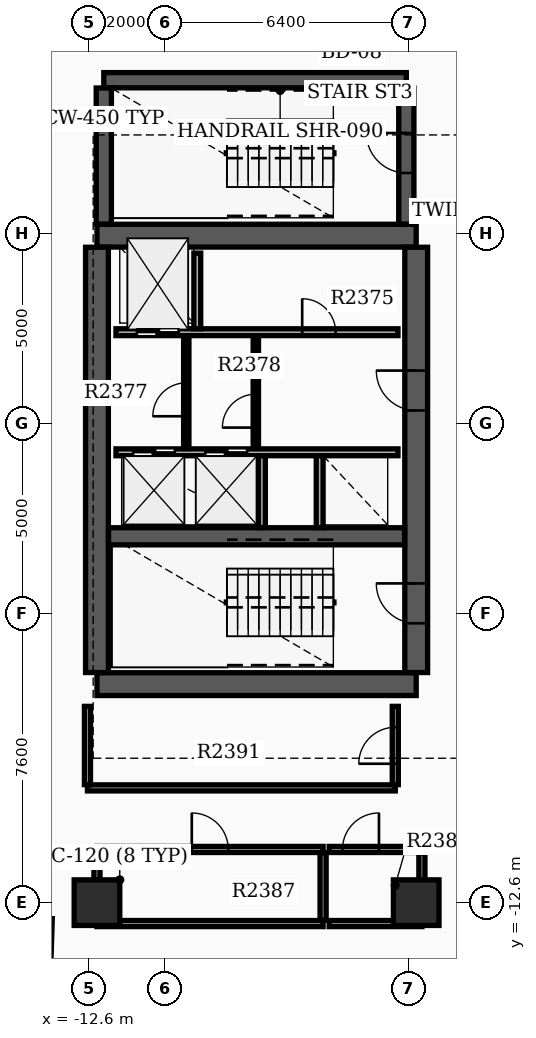
"""IFC4 building model, lengths in metres.
Left out: names, types, materials, properties, quantities, classifications, styles, units other than length and angle.
Written with IfcOpenShell. Run it as: python <this file> out.ifc"""

import sys

from ifc_helpers import new_model, si_unit, direction, frame, frame_2d, origin, origin_2d, place, context, subcontext, project, spatial, rectangle, extrude, element, fill, save


model = new_model("IFC4")
c1 = context("Model", 3, precision=1e-05, world=origin(), true_north=direction((0.0, 1.0)))
c2 = subcontext(c1, "Body", "Model", "MODEL_VIEW")
j1 = project(units=[si_unit("LENGTHUNIT", "METRE"), si_unit("PLANEANGLEUNIT", "RADIAN")], contexts=[c1])
p1 = place(None, origin())
s1 = spatial("IfcSite", under=j1, at=p1, CompositionType="ELEMENT")
p2 = place(p1, origin())
s2 = spatial("IfcBuilding", under=s1, at=p2, CompositionType="ELEMENT")
p3 = place(p2, frame((0.0, 0.0, 152.7)))
s3 = spatial("IfcBuildingStorey", under=s2, at=p3, CompositionType="ELEMENT", Elevation=152.7)
for number, where, z_axis, x_axis in (
    (1, (-12.4, -6.85, 0.0), (0.0, 0.0, 1.0), (1.0, 0.0, 0.0)),
    (2, (-12.4, 4.95, 0.0), (0.0, 0.0, 1.0), (1.0, 0.0, 0.0)),
):
    element("IfcWall", number, at=place(p3, frame(where, z_axis=z_axis, x_axis=x_axis)), inside=s3, PredefinedType="SHEAR", context=c2, shape_type="SweptSolid", body=[
        extrude(rectangle(XDim=8.4, YDim=0.6, at=frame_2d((4.2, 0.0))), origin(), (0.0, 0.0, 1.0), 3.7),
    ])
p4 = place(p3, frame((-12.4, -6.545, 0.0), z_axis=(0.0, 0.0, 1.0), x_axis=(0.0, 1.0, 0.0)))
e3 = element("IfcWall", 3, at=p4, inside=s3, PredefinedType="SHEAR", context=c2, shape_type="SweptSolid", body=[
    extrude(rectangle(XDim=11.19, YDim=0.6, at=frame_2d((5.595, 0.0))), origin(), (0.0, 0.0, 1.0), 3.7),
])
p5 = place(p3, frame((-4.0, -6.545, 0.0), z_axis=(0.0, 0.0, 1.0), x_axis=(0.0, 1.0, 0.0)))
e4 = element("IfcWall", 4, at=p5, inside=s3, PredefinedType="SHEAR", context=c2, shape_type="SweptSolid", body=[
    extrude(rectangle(XDim=11.19, YDim=0.6, at=frame_2d((5.595, 0.0))), origin(), (0.0, 0.0, 1.0), 3.7),
])
p6 = place(p5, frame((1.295, 0.0, 0.0)))
e5 = element("IfcOpeningElement", 5, at=p6, cuts=e4, PredefinedType="OPENING", context=c2, shape_type="SweptSolid", body=[
    extrude(rectangle(XDim=1.05, YDim=2.15, at=frame_2d((0.525, 1.075))), frame((0.0, 0.31, 0.0), z_axis=(0.0, -1.0, 0.0), x_axis=(1.0, 0.0, 0.0)), (0.0, 0.0, 1.0), 0.62),
])
p7 = place(p5, frame((6.895, 0.0, 0.0)))
e6 = element("IfcOpeningElement", 6, at=p7, cuts=e4, PredefinedType="OPENING", context=c2, shape_type="SweptSolid", body=[
    extrude(rectangle(XDim=1.05, YDim=2.15, at=frame_2d((0.525, 1.075))), frame((0.0, 0.31, 0.0), z_axis=(0.0, -1.0, 0.0), x_axis=(1.0, 0.0, 0.0)), (0.0, 0.0, 1.0), 0.62),
])
p8 = place(p3, frame((-12.095, -2.96, 0.0), z_axis=(0.0, 0.0, 1.0), x_axis=(1.0, 0.0, 0.0)))
e7 = element("IfcWall", 7, at=p8, inside=s3, PredefinedType="SHEAR", context=c2, shape_type="SweptSolid", body=[
    extrude(rectangle(XDim=7.79, YDim=0.45, at=frame_2d((3.895, 0.0))), origin(), (0.0, 0.0, 1.0), 3.7),
])
p9 = place(p3, frame((-12.22, 9.04, 0.0), z_axis=(0.0, 0.0, 1.0), x_axis=(1.0, 0.0, 0.0)))
e8 = element("IfcWall", 8, at=p9, inside=s3, PredefinedType="SHEAR", context=c2, shape_type="SweptSolid", body=[
    extrude(rectangle(XDim=7.96, YDim=0.4, at=frame_2d((3.98, 0.0))), origin(), (0.0, 0.0, 1.0), 3.7),
])
p10 = place(p3, frame((-12.22, 5.255, 0.0), z_axis=(0.0, 0.0, 1.0), x_axis=(0.0, 1.0, 0.0)))
e9 = element("IfcWall", 9, at=p10, inside=s3, PredefinedType="SHEAR", context=c2, shape_type="SweptSolid", body=[
    extrude(rectangle(XDim=3.58, YDim=0.4, at=frame_2d((1.79, 0.0))), origin(), (0.0, 0.0, 1.0), 3.7),
])
p11 = place(p3, frame((-4.26, 5.255, 0.0), z_axis=(0.0, 0.0, 1.0), x_axis=(0.0, 1.0, 0.0)))
e10 = element("IfcWall", 10, at=p11, inside=s3, PredefinedType="SHEAR", context=c2, shape_type="SweptSolid", body=[
    extrude(rectangle(XDim=3.58, YDim=0.4, at=frame_2d((1.79, 0.0))), origin(), (0.0, 0.0, 1.0), 3.7),
])
p12 = place(p11, frame((1.345, 0.0, 0.0)))
e11 = element("IfcOpeningElement", 11, at=p12, cuts=e10, PredefinedType="OPENING", context=c2, shape_type="SweptSolid", body=[
    extrude(rectangle(XDim=1.05, YDim=2.15, at=frame_2d((0.525, 1.075))), frame((0.0, 0.21, 0.0), z_axis=(0.0, -1.0, 0.0), x_axis=(1.0, 0.0, 0.0)), (0.0, 0.0, 1.0), 0.42),
])
for number, where, z_axis, x_axis in (
    (12, (-12.4, -12.6, 0.0), (0.0, 0.0, 1.0), (1.0, 0.0, 0.0)),
    (13, (-4.0, -12.6, 0.0), (0.0, 0.0, 1.0), (1.0, 0.0, 0.0)),
):
    element("IfcColumn", number, at=place(p3, frame(where, z_axis=z_axis, x_axis=x_axis)), inside=s3, PredefinedType="COLUMN", context=c2, shape_type="SweptSolid", body=[
        extrude(rectangle(XDim=1.2, YDim=1.2, at=origin_2d()), origin(), (0.0, 0.0, 1.0), 3.9),
    ])
p13 = place(p3, frame((-11.9, 2.41, 0.0), z_axis=(0.0, 0.0, 1.0), x_axis=(1.0, 0.0, 0.0)))
e14 = element("IfcWall", 14, at=p13, inside=s3, PredefinedType="SOLIDWALL", context=c2, shape_type="SweptSolid", body=[
    extrude(rectangle(XDim=7.42, YDim=0.18, at=frame_2d((3.71, 0.0))), origin(), (0.0, 0.0, 1.0), 2.96),
])
p14 = place(p13, frame((0.55, 0.0, 0.0)))
e15 = element("IfcOpeningElement", 15, at=p14, cuts=e14, PredefinedType="OPENING", context=c2, shape_type="SweptSolid", body=[
    extrude(rectangle(XDim=1.1, YDim=2.15, at=frame_2d((0.55, 1.075))), frame((0.0, 0.1, 0.0), z_axis=(0.0, -1.0, 0.0), x_axis=(1.0, 0.0, 0.0)), (0.0, 0.0, 1.0), 0.2),
])
p15 = place(p13, frame((4.9, 0.0, 0.0)))
e16 = element("IfcOpeningElement", 16, at=p15, cuts=e14, PredefinedType="OPENING", context=c2, shape_type="SweptSolid", body=[
    extrude(rectangle(XDim=0.88, YDim=2.1, at=frame_2d((0.44, 1.05))), frame((0.0, 0.1, 0.0), z_axis=(0.0, -1.0, 0.0), x_axis=(1.0, 0.0, 0.0)), (0.0, 0.0, 1.0), 0.2),
])
p16 = place(p3, frame((-11.9, -0.75, 0.0), z_axis=(0.0, 0.0, 1.0), x_axis=(1.0, 0.0, 0.0)))
e17 = element("IfcWall", 17, at=p16, inside=s3, PredefinedType="SOLIDWALL", context=c2, shape_type="SweptSolid", body=[
    extrude(rectangle(XDim=7.42, YDim=0.18, at=frame_2d((3.71, 0.0))), origin(), (0.0, 0.0, 1.0), 2.96),
])
p17 = place(p16, frame((0.45, 0.0, 0.0)))
e18 = element("IfcOpeningElement", 18, at=p17, cuts=e17, PredefinedType="OPENING", context=c2, shape_type="SweptSolid", body=[
    extrude(rectangle(XDim=1.1, YDim=2.15, at=frame_2d((0.55, 1.075))), frame((0.0, 0.1, 0.0), z_axis=(0.0, -1.0, 0.0), x_axis=(1.0, 0.0, 0.0)), (0.0, 0.0, 1.0), 0.2),
])
p18 = place(p16, frame((2.35, 0.0, 0.0)))
e19 = element("IfcOpeningElement", 19, at=p18, cuts=e17, PredefinedType="OPENING", context=c2, shape_type="SweptSolid", body=[
    extrude(rectangle(XDim=1.1, YDim=2.15, at=frame_2d((0.55, 1.075))), frame((0.0, 0.1, 0.0), z_axis=(0.0, -1.0, 0.0), x_axis=(1.0, 0.0, 0.0)), (0.0, 0.0, 1.0), 0.2),
])
p19 = place(p3, frame((-9.76, 2.5, 0.0), z_axis=(0.0, 0.0, 1.0), x_axis=(0.0, 1.0, 0.0)))
e20 = element("IfcWall", 20, at=p19, inside=s3, PredefinedType="SOLIDWALL", context=c2, shape_type="SweptSolid", body=[
    extrude(rectangle(XDim=1.99, YDim=0.18, at=frame_2d((0.995, 0.0))), origin(), (0.0, 0.0, 1.0), 2.96),
])
for number, where, z_axis, x_axis in (
    (21, (-8.06, -2.73, 0.0), (0.0, 0.0, 1.0), (0.0, 1.0, 0.0)),
    (22, (-6.54, -2.73, 0.0), (0.0, 0.0, 1.0), (0.0, 1.0, 0.0)),
):
    element("IfcWall", number, at=place(p3, frame(where, z_axis=z_axis, x_axis=x_axis)), inside=s3, PredefinedType="SOLIDWALL", context=c2, shape_type="SweptSolid", body=[
        extrude(rectangle(XDim=1.89, YDim=0.18, at=frame_2d((0.945, 0.0))), origin(), (0.0, 0.0, 1.0), 2.96),
    ])
p20 = place(p3, frame((-8.22, -0.65, 0.0), z_axis=(0.0, 0.0, 1.0), x_axis=(0.0, 1.0, 0.0)))
e23 = element("IfcWall", 23, at=p20, inside=s3, PredefinedType="SOLIDWALL", context=c2, shape_type="SweptSolid", body=[
    extrude(rectangle(XDim=2.96, YDim=0.14, at=frame_2d((1.48, 0.0))), origin(), (0.0, 0.0, 1.0), 2.96),
])
p21 = place(p20, frame((0.55, 0.0, 0.0)))
e24 = element("IfcOpeningElement", 24, at=p21, cuts=e23, PredefinedType="OPENING", context=c2, shape_type="SweptSolid", body=[
    extrude(rectangle(XDim=0.88, YDim=2.1, at=frame_2d((0.44, 1.05))), frame((0.0, 0.08, 0.0), z_axis=(0.0, -1.0, 0.0), x_axis=(1.0, 0.0, 0.0)), (0.0, 0.0, 1.0), 0.16),
])
p22 = place(p3, frame((-10.05, -0.652, 0.0), z_axis=(0.0, 0.0, 1.0), x_axis=(0.0, 1.0, 0.0)))
e25 = element("IfcWall", 25, at=p22, inside=s3, PredefinedType="PARTITIONING", context=c2, shape_type="SweptSolid", body=[
    extrude(rectangle(XDim=2.962, YDim=0.14, at=frame_2d((1.481, 0.0))), origin(), (0.0, 0.0, 1.0), 2.96),
])
p23 = place(p22, frame((0.85, 0.0, 0.0)))
e26 = element("IfcOpeningElement", 26, at=p23, cuts=e25, PredefinedType="OPENING", context=c2, shape_type="SweptSolid", body=[
    extrude(rectangle(XDim=0.88, YDim=2.1, at=frame_2d((0.44, 1.05))), frame((0.0, 0.08, 0.0), z_axis=(0.0, -1.0, 0.0), x_axis=(1.0, 0.0, 0.0)), (0.0, 0.0, 1.0), 0.16),
])
p24 = place(p3, frame((-12.4, -13.15, 0.0), z_axis=(0.0, 0.0, 1.0), x_axis=(1.0, 0.0, 0.0)))
e27 = element("IfcWall", 27, at=p24, inside=s3, PredefinedType="PARTITIONING", context=c2, shape_type="SweptSolid", body=[
    extrude(rectangle(XDim=5.95, YDim=0.16, at=frame_2d((2.975, 0.0))), origin(), (0.0, 0.0, 1.0), 2.96),
])
p25 = place(p3, frame((-12.4, -11.2, 0.0), z_axis=(0.0, 0.0, 1.0), x_axis=(1.0, 0.0, 0.0)))
e28 = element("IfcWall", 28, at=p25, inside=s3, PredefinedType="PARTITIONING", context=c2, shape_type="SweptSolid", body=[
    extrude(rectangle(XDim=5.95, YDim=0.16, at=frame_2d((2.975, 0.0))), origin(), (0.0, 0.0, 1.0), 2.96),
])
p26 = place(p25, frame((2.495, 0.0, 0.0)))
e29 = element("IfcOpeningElement", 29, at=p26, cuts=e28, PredefinedType="OPENING", context=c2, shape_type="SweptSolid", body=[
    extrude(rectangle(XDim=0.96, YDim=2.15, at=frame_2d((0.48, 1.075))), frame((0.0, 0.09, 0.0), z_axis=(0.0, -1.0, 0.0), x_axis=(1.0, 0.0, 0.0)), (0.0, 0.0, 1.0), 0.18),
])
for number, where, z_axis, x_axis in (
    (30, (-12.4, -13.065, 0.0), (0.0, 0.0, 1.0), (0.0, 1.0, 0.0)),
    (31, (-6.45, -13.065, 0.0), (0.0, 0.0, 1.0), (0.0, 1.0, 0.0)),
):
    element("IfcWall", number, at=place(p3, frame(where, z_axis=z_axis, x_axis=x_axis)), inside=s3, PredefinedType="PARTITIONING", context=c2, shape_type="SweptSolid", body=[
        extrude(rectangle(XDim=1.78, YDim=0.16, at=frame_2d((0.89, 0.0))), origin(), (0.0, 0.0, 1.0), 2.96),
    ])
p27 = place(p3, frame((-6.29, -13.15, 0.0), z_axis=(0.0, 0.0, 1.0), x_axis=(1.0, 0.0, 0.0)))
e32 = element("IfcWall", 32, at=p27, inside=s3, PredefinedType="PARTITIONING", context=c2, shape_type="SweptSolid", body=[
    extrude(rectangle(XDim=2.44, YDim=0.16, at=frame_2d((1.22, 0.0))), origin(), (0.0, 0.0, 1.0), 2.96),
])
p28 = place(p3, frame((-6.29, -11.2, 0.0), z_axis=(0.0, 0.0, 1.0), x_axis=(1.0, 0.0, 0.0)))
e33 = element("IfcWall", 33, at=p28, inside=s3, PredefinedType="PARTITIONING", context=c2, shape_type="SweptSolid", body=[
    extrude(rectangle(XDim=2.44, YDim=0.16, at=frame_2d((1.22, 0.0))), origin(), (0.0, 0.0, 1.0), 2.96),
])
p29 = place(p28, frame((0.35, 0.0, 0.0)))
e34 = element("IfcOpeningElement", 34, at=p29, cuts=e33, PredefinedType="OPENING", context=c2, shape_type="SweptSolid", body=[
    extrude(rectangle(XDim=0.96, YDim=2.15, at=frame_2d((0.48, 1.075))), frame((0.0, 0.09, 0.0), z_axis=(0.0, -1.0, 0.0), x_axis=(1.0, 0.0, 0.0)), (0.0, 0.0, 1.0), 0.18),
])
p30 = place(p3, frame((-3.85, -13.065, 0.0), z_axis=(0.0, 0.0, 1.0), x_axis=(0.0, 1.0, 0.0)))
e35 = element("IfcWall", 35, at=p30, inside=s3, PredefinedType="PARTITIONING", context=c2, shape_type="SweptSolid", body=[
    extrude(rectangle(XDim=1.78, YDim=0.16, at=frame_2d((0.89, 0.0))), origin(), (0.0, 0.0, 1.0), 2.96),
])
p31 = place(p3, frame((-12.65, -9.58, 0.0), z_axis=(0.0, 0.0, 1.0), x_axis=(1.0, 0.0, 0.0)))
e36 = element("IfcWall", 36, at=p31, inside=s3, PredefinedType="PARTITIONING", context=c2, shape_type="SweptSolid", body=[
    extrude(rectangle(XDim=8.1, YDim=0.16, at=frame_2d((4.05, 0.0))), origin(), (0.0, 0.0, 1.0), 2.96),
])
p32 = place(p3, frame((-12.65, -9.495, 0.0), z_axis=(0.0, 0.0, 1.0), x_axis=(0.0, 1.0, 0.0)))
e37 = element("IfcWall", 37, at=p32, inside=s3, PredefinedType="PARTITIONING", context=c2, shape_type="SweptSolid", body=[
    extrude(rectangle(XDim=2.06, YDim=0.16, at=frame_2d((1.03, 0.0))), origin(), (0.0, 0.0, 1.0), 2.96),
])
p33 = place(p3, frame((-4.55, -9.495, 0.0), z_axis=(0.0, 0.0, 1.0), x_axis=(0.0, 1.0, 0.0)))
e38 = element("IfcWall", 38, at=p33, inside=s3, PredefinedType="PARTITIONING", context=c2, shape_type="SweptSolid", body=[
    extrude(rectangle(XDim=2.06, YDim=0.16, at=frame_2d((1.03, 0.0))), origin(), (0.0, 0.0, 1.0), 2.96),
])
p34 = place(p33, frame((0.55, 0.0, 0.0)))
e39 = element("IfcOpeningElement", 39, at=p34, cuts=e38, PredefinedType="OPENING", context=c2, shape_type="SweptSolid", body=[
    extrude(rectangle(XDim=0.96, YDim=2.15, at=frame_2d((0.48, 1.075))), frame((0.0, 0.09, 0.0), z_axis=(0.0, -1.0, 0.0), x_axis=(1.0, 0.0, 0.0)), (0.0, 0.0, 1.0), 0.18),
])
p35 = place(p6, origin())
e40 = element("IfcDoor", 40, at=p35, inside=s3, OperationType="SINGLE_SWING_RIGHT", PredefinedType="DOOR", context=c2, shape_type="SweptSolid", body=[
    extrude(rectangle(XDim=1.05, YDim=2.15, at=frame_2d((0.525, 1.075))), frame((0.0, 0.025, 0.0), z_axis=(0.0, -1.0, 0.0), x_axis=(1.0, 0.0, 0.0)), (0.0, 0.0, 1.0), 0.05),
])
fill(e5, e40)
p36 = place(p7, origin())
e41 = element("IfcDoor", 41, at=p36, inside=s3, OperationType="SINGLE_SWING_RIGHT", PredefinedType="DOOR", context=c2, shape_type="SweptSolid", body=[
    extrude(rectangle(XDim=1.05, YDim=2.15, at=frame_2d((0.525, 1.075))), frame((0.0, 0.025, 0.0), z_axis=(0.0, -1.0, 0.0), x_axis=(1.0, 0.0, 0.0)), (0.0, 0.0, 1.0), 0.05),
])
fill(e6, e41)
p37 = place(p12, origin())
e42 = element("IfcDoor", 42, at=p37, inside=s3, OperationType="SINGLE_SWING_RIGHT", PredefinedType="DOOR", context=c2, shape_type="SweptSolid", body=[
    extrude(rectangle(XDim=1.05, YDim=2.15, at=frame_2d((0.525, 1.075))), frame((0.0, 0.025, 0.0), z_axis=(0.0, -1.0, 0.0), x_axis=(1.0, 0.0, 0.0)), (0.0, 0.0, 1.0), 0.05),
])
fill(e11, e42)
p38 = place(p14, origin())
e43 = element("IfcDoor", 43, at=p38, inside=s3, OperationType="DOUBLE_DOOR_SLIDING", PredefinedType="DOOR", context=c2, shape_type="SweptSolid", body=[
    extrude(rectangle(XDim=1.1, YDim=2.15, at=frame_2d((0.55, 1.075))), frame((0.0, 0.025, 0.0), z_axis=(0.0, -1.0, 0.0), x_axis=(1.0, 0.0, 0.0)), (0.0, 0.0, 1.0), 0.05),
])
fill(e15, e43)
p39 = place(p17, origin())
e44 = element("IfcDoor", 44, at=p39, inside=s3, OperationType="DOUBLE_DOOR_SLIDING", PredefinedType="DOOR", context=c2, shape_type="SweptSolid", body=[
    extrude(rectangle(XDim=1.1, YDim=2.15, at=frame_2d((0.55, 1.075))), frame((0.0, 0.025, 0.0), z_axis=(0.0, -1.0, 0.0), x_axis=(1.0, 0.0, 0.0)), (0.0, 0.0, 1.0), 0.05),
])
fill(e18, e44)
p40 = place(p18, origin())
e45 = element("IfcDoor", 45, at=p40, inside=s3, OperationType="DOUBLE_DOOR_SLIDING", PredefinedType="DOOR", context=c2, shape_type="SweptSolid", body=[
    extrude(rectangle(XDim=1.1, YDim=2.15, at=frame_2d((0.55, 1.075))), frame((0.0, 0.025, 0.0), z_axis=(0.0, -1.0, 0.0), x_axis=(1.0, 0.0, 0.0)), (0.0, 0.0, 1.0), 0.05),
])
fill(e19, e45)
p41 = place(p15, origin())
e46 = element("IfcDoor", 46, at=p41, inside=s3, OperationType="SINGLE_SWING_LEFT", PredefinedType="DOOR", context=c2, shape_type="SweptSolid", body=[
    extrude(rectangle(XDim=0.88, YDim=2.1, at=frame_2d((0.44, 1.05))), frame((0.0, 0.025, 0.0), z_axis=(0.0, -1.0, 0.0), x_axis=(1.0, 0.0, 0.0)), (0.0, 0.0, 1.0), 0.05),
])
fill(e16, e46)
p42 = place(p21, origin())
e47 = element("IfcDoor", 47, at=p42, inside=s3, OperationType="SINGLE_SWING_LEFT", PredefinedType="DOOR", context=c2, shape_type="SweptSolid", body=[
    extrude(rectangle(XDim=0.88, YDim=2.1, at=frame_2d((0.44, 1.05))), frame((0.0, 0.025, 0.0), z_axis=(0.0, -1.0, 0.0), x_axis=(1.0, 0.0, 0.0)), (0.0, 0.0, 1.0), 0.05),
])
fill(e24, e47)
p43 = place(p23, origin())
e48 = element("IfcDoor", 48, at=p43, inside=s3, OperationType="SINGLE_SWING_LEFT", PredefinedType="DOOR", context=c2, shape_type="SweptSolid", body=[
    extrude(rectangle(XDim=0.88, YDim=2.1, at=frame_2d((0.44, 1.05))), frame((0.0, 0.025, 0.0), z_axis=(0.0, -1.0, 0.0), x_axis=(1.0, 0.0, 0.0)), (0.0, 0.0, 1.0), 0.05),
])
fill(e26, e48)
p44 = place(p26, origin())
e49 = element("IfcDoor", 49, at=p44, inside=s3, OperationType="SINGLE_SWING_LEFT", PredefinedType="DOOR", context=c2, shape_type="SweptSolid", body=[
    extrude(rectangle(XDim=0.96, YDim=2.15, at=frame_2d((0.48, 1.075))), frame((0.0, 0.025, 0.0), z_axis=(0.0, -1.0, 0.0), x_axis=(1.0, 0.0, 0.0)), (0.0, 0.0, 1.0), 0.05),
])
fill(e29, e49)
p45 = place(p29, origin())
e50 = element("IfcDoor", 50, at=p45, inside=s3, OperationType="SINGLE_SWING_RIGHT", PredefinedType="DOOR", context=c2, shape_type="SweptSolid", body=[
    extrude(rectangle(XDim=0.96, YDim=2.15, at=frame_2d((0.48, 1.075))), frame((0.0, 0.025, 0.0), z_axis=(0.0, -1.0, 0.0), x_axis=(1.0, 0.0, 0.0)), (0.0, 0.0, 1.0), 0.05),
])
fill(e34, e50)
p46 = place(p34, origin())
e51 = element("IfcDoor", 51, at=p46, inside=s3, OperationType="SINGLE_SWING_LEFT", PredefinedType="DOOR", context=c2, shape_type="SweptSolid", body=[
    extrude(rectangle(XDim=0.96, YDim=2.15, at=frame_2d((0.48, 1.075))), frame((0.0, 0.025, 0.0), z_axis=(0.0, -1.0, 0.0), x_axis=(1.0, 0.0, 0.0)), (0.0, 0.0, 1.0), 0.05),
])
fill(e39, e51)
save(model, sys.argv[1])
